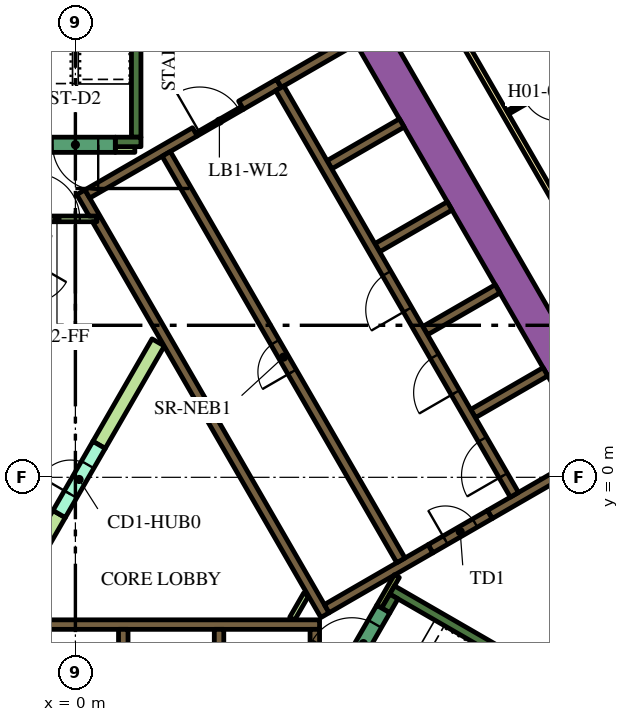
"""IFC4 building model, lengths in metres.
Left out: names, types, materials, properties, quantities, classifications, styles, units other than length and angle.
Written with IfcOpenShell. Run it as: python <this file> out.ifc"""

import sys

from ifc_helpers import new_model, si_unit, direction, frame, frame_2d, origin, place, context, subcontext, project, spatial, polyline, rectangle, outline, extrude, element, fill, save


model = new_model("IFC4")
c1 = context("Model", 3, precision=1e-05, world=origin(), true_north=direction((0.0, 1.0)))
c2 = subcontext(c1, "Body", "Model", "MODEL_VIEW")
j1 = project(units=[si_unit("LENGTHUNIT", "METRE"), si_unit("PLANEANGLEUNIT", "RADIAN")], contexts=[c1])
p1 = place(None, origin())
s1 = spatial("IfcSite", under=j1, at=p1, CompositionType="ELEMENT")
p2 = place(p1, origin())
s2 = spatial("IfcBuilding", under=s1, at=p2, CompositionType="ELEMENT")
p3 = place(p2, frame((0.0, 0.0, 35.4)))
s3 = spatial("IfcBuildingStorey", under=s2, at=p3, CompositionType="ELEMENT", Elevation=35.4)
p4 = place(p3, frame((6.711, 13.476, 0.0), z_axis=(0.0, 0.0, 1.0), x_axis=(0.500002723396, -0.866023831425, 0.0)))
e1 = element("IfcWall", 1, at=p4, inside=s3, PredefinedType="SOLIDWALL", context=c2, shape_type="SweptSolid", body=[
    extrude(rectangle(XDim=20.334, YDim=0.9, at=frame_2d((10.167, 0.0))), origin(), (0.0, 0.0, 1.0), 3.9),
])
p5 = place(p3, frame((11.695, -12.644, 0.0), z_axis=(0.0, 0.0, 1.0), x_axis=(0.500010229568, 0.86601949766, 0.0)))
e2 = element("IfcWall", 2, at=p5, inside=s3, PredefinedType="SOLIDWALL", context=c2, shape_type="SweptSolid", body=[
    extrude(rectangle(XDim=9.326, YDim=0.9, at=frame_2d((4.663, 0.0))), origin(), (0.0, 0.0, 1.0), 3.9),
])
p6 = place(p3, frame((8.334, -2.964, 0.0), z_axis=(0.0, 0.0, 1.0), x_axis=(0.866016039709, -0.500016218704, 0.0)))
e3 = element("IfcWall", 3, at=p6, inside=s3, PredefinedType="SOLIDWALL", context=c2, shape_type="SweptSolid", body=[
    extrude(rectangle(XDim=7.05, YDim=0.25, at=frame_2d((3.525, 0.0))), origin(), (0.0, 0.0, 1.0), 3.9),
])
p7 = place(p3, frame((8.168, -3.503, 0.0), z_axis=(0.0, 0.0, 1.0), x_axis=(0.49972245349, 0.866185586049, 0.0)))
e4 = element("IfcWall", 4, at=p7, inside=s3, PredefinedType="SOLIDWALL", context=c2, shape_type="SweptSolid", body=[
    extrude(rectangle(XDim=0.425, YDim=0.25, at=frame_2d((0.212, 0.0))), origin(), (0.0, 0.0, 1.0), 3.9),
])
p8 = place(p3, frame((1.6, 8.95, 0.0), z_axis=(0.0, 0.0, 1.0), x_axis=(0.0, 1.0, 0.0)))
e5 = element("IfcWall", 5, at=p8, inside=s3, PredefinedType="SOLIDWALL", context=c2, shape_type="SweptSolid", body=[
    extrude(rectangle(XDim=6.8, YDim=0.25, at=frame_2d((3.4, 0.0))), origin(), (0.0, 0.0, 1.0), 3.9),
])
p9 = place(p3, frame((1.05, 8.825, 0.0), z_axis=(0.0, 0.0, 1.0), x_axis=(1.0, 0.0, 0.0)))
e6 = element("IfcWall", 6, at=p9, inside=s3, PredefinedType="SOLIDWALL", context=c2, shape_type="SweptSolid", body=[
    extrude(rectangle(XDim=0.675, YDim=0.25, at=frame_2d((0.337, 0.0))), origin(), (0.0, 0.0, 1.0), 3.9),
])
p10 = place(p3, frame((-5.545, -3.875, 0.0), z_axis=(0.0, 0.0, 1.0), x_axis=(1.0, 0.0, 0.0)))
e7 = element("IfcWall", 7, at=p10, inside=s3, PredefinedType="SOLIDWALL", context=c2, shape_type="SweptSolid", body=[
    extrude(rectangle(XDim=11.97, YDim=0.25, at=frame_2d((5.985, 0.0))), origin(), (0.0, 0.0, 1.0), 3.9),
])
p11 = place(p3, frame((6.3, -7.268, 0.0), z_axis=(0.0, 0.0, 1.0), x_axis=(0.0, 1.0, 0.0)))
e8 = element("IfcWall", 8, at=p11, inside=s3, PredefinedType="SOLIDWALL", context=c2, shape_type="SweptSolid", body=[
    extrude(rectangle(XDim=3.268, YDim=0.25, at=frame_2d((1.634, 0.0))), origin(), (0.0, 0.0, 1.0), 3.9),
])
for number, where, z_axis, x_axis in (
    (9, (3.78, -4.0, 0.0), (0.0, 0.0, 1.0), (0.0, -1.0, 0.0)),
    (10, (1.26, -4.0, 0.0), (0.0, 0.0, 1.0), (0.0, -1.0, 0.0)),
    (11, (10.464, 1.677, 0.0), (0.0, 0.0, 1.0), (0.866, 0.5, 0.0)),
):
    element("IfcWall", number, at=place(p3, frame(where, z_axis=z_axis, x_axis=x_axis)), inside=s3, PredefinedType="SOLIDWALL", context=c2, shape_type="SweptSolid", body=[
        extrude(rectangle(XDim=2.2, YDim=0.25, at=frame_2d((1.1, 0.0))), origin(), (0.0, 0.0, 1.0), 3.9),
    ])
p12 = place(p3, frame((13.629, 0.594, 0.0), z_axis=(0.0, 0.0, 1.0), x_axis=(-0.86602790099, -0.499995674689, 0.0)))
e12 = element("IfcWall", 12, at=p12, inside=s3, PredefinedType="SOLIDWALL", context=c2, shape_type="SweptSolid", body=[
    extrude(rectangle(XDim=3.146, YDim=0.25, at=frame_2d((1.573, 0.0))), origin(), (0.0, 0.0, 1.0), 3.9),
])
p13 = place(p3, origin())
e13 = element("IfcWall", 13, at=p13, inside=s3, PredefinedType="SOLIDWALL", context=c2, shape_type="SweptSolid", body=[
    extrude(outline(polyline([(0.566, 6.725), (0.566, 6.875), (0.566, 6.875), (0.565, 6.875), (0.361, 6.875), (0.035, 7.439), (0.252, 7.564), (0.377, 7.348), (6.552, -3.348), (6.677, -3.564), (6.46, -3.689), (0.448, 6.725), (0.565, 6.725), (0.566, 6.725), (0.566, 6.725)])), origin(), (0.0, 0.0, 1.0), 3.9),
])
p14 = place(p3, frame((4.358, 9.791, 0.0), z_axis=(0.0, 0.0, 1.0), x_axis=(0.866079547155, 0.499906209203, 0.0)))
e14 = element("IfcWall", 14, at=p14, inside=s3, PredefinedType="SOLIDWALL", context=c2, shape_type="SweptSolid", body=[
    extrude(rectangle(XDim=1.15, YDim=0.25, at=frame_2d((0.575, 0.0))), origin(), (0.0, 0.0, 1.0), 3.9),
])
p15 = place(p3, frame((5.356, 10.367, 0.0), z_axis=(0.0, 0.0, 1.0), x_axis=(0.865978535641, 0.50008116922, 0.0)))
e15 = element("IfcWall", 15, at=p15, inside=s3, PredefinedType="SOLIDWALL", context=c2, shape_type="SweptSolid", body=[
    extrude(rectangle(XDim=2.278, YDim=0.25, at=frame_2d((1.139, 0.0))), origin(), (0.0, 0.0, 1.0), 3.9),
])
p16 = place(p3, frame((0.314, 7.456, 0.0), z_axis=(0.0, 0.0, 1.0), x_axis=(0.866013897511, 0.50001992892, 0.0)))
e16 = element("IfcWall", 16, at=p16, inside=s3, PredefinedType="SOLIDWALL", context=c2, shape_type="SweptSolid", body=[
    extrude(rectangle(XDim=3.268, YDim=0.25, at=frame_2d((1.634, 0.0))), origin(), (0.0, 0.0, 1.0), 3.9),
])
p17 = place(p3, frame((6.614, -3.456, 0.0), z_axis=(0.0, 0.0, 1.0), x_axis=(0.86602447079, 0.500001615989, 0.0)))
e17 = element("IfcWall", 17, at=p17, inside=s3, PredefinedType="SOLIDWALL", context=c2, shape_type="SweptSolid", body=[
    extrude(rectangle(XDim=3.154, YDim=0.25, at=frame_2d((1.577, 0.0))), origin(), (0.0, 0.0, 1.0), 3.9),
])
for number, where, z_axis, x_axis in (
    (18, (6.684, 8.224, 0.0), (0.0, 0.0, 1.0), (0.866, 0.5, 0.0)),
    (19, (7.944, 6.041, 0.0), (0.0, 0.0, 1.0), (0.866, 0.5, 0.0)),
    (20, (9.204, 3.859, 0.0), (0.0, 0.0, 1.0), (0.866, 0.5, 0.0)),
):
    element("IfcWall", number, at=place(p3, frame(where, z_axis=z_axis, x_axis=x_axis)), inside=s3, PredefinedType="SOLIDWALL", context=c2, shape_type="SweptSolid", body=[
        extrude(rectangle(XDim=2.2, YDim=0.25, at=frame_2d((1.1, 0.0))), origin(), (0.0, 0.0, 1.0), 3.9),
    ])
p18 = place(p3, frame((5.705, -3.718, 0.0), z_axis=(0.0, 0.0, 1.0), x_axis=(0.499962090823, 0.866047289552, 0.0)))
e21 = element("IfcWall", 21, at=p18, inside=s3, PredefinedType="PARTITIONING", context=c2, shape_type="SweptSolid", body=[
    extrude(rectangle(XDim=0.735, YDim=0.15, at=frame_2d((0.367, 0.0))), origin(), (0.0, 0.0, 1.0), 2.75),
])
p19 = place(p3, frame((8.459, -2.599, 0.0), z_axis=(0.0, 0.0, 1.0), x_axis=(-0.500041054325, -0.866001699761, 0.0)))
e22 = element("IfcWall", 22, at=p19, inside=s3, PredefinedType="PARTITIONING", context=c2, shape_type="SweptSolid", body=[
    extrude(rectangle(XDim=0.929, YDim=0.15, at=frame_2d((0.464, 0.0))), origin(), (0.0, 0.0, 1.0), 3.9),
])
e23 = element("IfcWall", 23, at=p13, inside=s3, PredefinedType="PARTITIONING", context=c2, shape_type="SweptSolid", body=[
    extrude(outline(polyline([(-0.59, -0.872), (-0.265, -1.059), (-1.822, -3.756), (-2.147, -3.568), (-0.59, -0.872)])), origin(), (0.0, 0.0, 1.0), 2.75),
])
e24 = element("IfcWall", 24, at=p13, inside=s3, PredefinedType="PARTITIONING", context=c2, shape_type="SweptSolid", body=[
    extrude(outline(polyline([(2.017, 3.643), (2.342, 3.456), (0.785, 0.76), (0.46, 0.947), (2.017, 3.643)])), origin(), (0.0, 0.0, 1.0), 2.75),
])
p20 = place(p3, frame((1.05, 8.625, 0.0), z_axis=(0.0, 0.0, 1.0), x_axis=(1.0, 0.0, 0.0)))
e25 = element("IfcWall", 25, at=p20, inside=s3, PredefinedType="PARTITIONING", context=c2, shape_type="SweptSolid", body=[
    extrude(rectangle(XDim=0.514, YDim=0.15, at=frame_2d((0.257, 0.0))), origin(), (0.0, 0.0, 1.0), 2.75),
])
p21 = place(p3, frame((11.553, -0.46, 0.0), z_axis=(0.0, 0.0, 1.0), x_axis=(-0.500006514828, 0.866021642414, 0.0)))
e26 = element("IfcWall", 26, at=p21, inside=s3, PredefinedType="SOLIDWALL", context=c2, shape_type="SweptSolid", body=[
    extrude(rectangle(XDim=12.35, YDim=0.25, at=frame_2d((6.175, 0.0))), origin(), (0.0, 0.0, 1.0), 3.9),
])
p22 = place(p21, frame((0.585, 0.0, 0.0)))
e27 = element("IfcOpeningElement", 27, at=p22, cuts=e26, PredefinedType="OPENING", context=c2, shape_type="SweptSolid", body=[
    extrude(rectangle(XDim=1.1, YDim=2.1, at=frame_2d((0.55, 1.05))), frame((0.0, 0.135, 0.0), z_axis=(0.0, -1.0, 0.0), x_axis=(1.0, 0.0, 0.0)), (0.0, 0.0, 1.0), 0.27),
])
p23 = place(p21, frame((3.105, 0.0, 0.0)))
e28 = element("IfcOpeningElement", 28, at=p23, cuts=e26, PredefinedType="OPENING", context=c2, shape_type="SweptSolid", body=[
    extrude(rectangle(XDim=1.1, YDim=2.1, at=frame_2d((0.55, 1.05))), frame((0.0, 0.135, 0.0), z_axis=(0.0, -1.0, 0.0), x_axis=(1.0, 0.0, 0.0)), (0.0, 0.0, 1.0), 0.27),
])
p24 = place(p21, frame((5.625, 0.0, 0.0)))
e29 = element("IfcOpeningElement", 29, at=p24, cuts=e26, PredefinedType="OPENING", context=c2, shape_type="SweptSolid", body=[
    extrude(rectangle(XDim=1.1, YDim=2.1, at=frame_2d((0.55, 1.05))), frame((0.0, 0.135, 0.0), z_axis=(0.0, -1.0, 0.0), x_axis=(1.0, 0.0, 0.0)), (0.0, 0.0, 1.0), 0.27),
])
p25 = place(p3, frame((8.565, -2.185, 0.0), z_axis=(0.0, 0.0, 1.0), x_axis=(-0.499997954832, 0.866026584559, 0.0)))
e30 = element("IfcWall", 30, at=p25, inside=s3, PredefinedType="SOLIDWALL", context=c2, shape_type="SweptSolid", body=[
    extrude(rectangle(XDim=12.35, YDim=0.25, at=frame_2d((6.175, 0.0))), origin(), (0.0, 0.0, 1.0), 3.9),
])
p26 = place(p25, frame((5.725, 0.0, 0.0)))
e31 = element("IfcOpeningElement", 31, at=p26, cuts=e30, PredefinedType="OPENING", context=c2, shape_type="SweptSolid", body=[
    extrude(rectangle(XDim=0.9, YDim=2.1, at=frame_2d((0.45, 1.05))), frame((0.0, 0.135, 0.0), z_axis=(0.0, -1.0, 0.0), x_axis=(1.0, 0.0, 0.0)), (0.0, 0.0, 1.0), 0.27),
])
p27 = place(p3, frame((7.053, -5.284, 0.0), z_axis=(0.0, 0.0, 1.0), x_axis=(0.500078061341, 0.865980330357, 0.0)))
e32 = element("IfcWall", 32, at=p27, inside=s3, PredefinedType="SOLIDWALL", context=c2, shape_type="SweptSolid", body=[
    extrude(rectangle(XDim=2.1, YDim=0.4, at=frame_2d((1.05, 0.0))), origin(), (0.0, 0.0, 1.0), 3.9),
])
p28 = place(p27, frame((0.45, 0.0, 0.0)))
e33 = element("IfcOpeningElement", 33, at=p28, cuts=e32, PredefinedType="OPENING", context=c2, shape_type="SweptSolid", body=[
    extrude(rectangle(XDim=1.2, YDim=2.1, at=frame_2d((0.6, 1.05))), frame((0.0, 0.21, 0.0), z_axis=(0.0, -1.0, 0.0), x_axis=(1.0, 0.0, 0.0)), (0.0, 0.0, 1.0), 0.42),
])
p29 = place(p3, frame((9.346, -1.879, 0.0), z_axis=(0.0, 0.0, 1.0), x_axis=(0.866047807691, 0.499961193289, 0.0)))
e34 = element("IfcWall", 34, at=p29, inside=s3, PredefinedType="SOLIDWALL", context=c2, shape_type="SweptSolid", body=[
    extrude(rectangle(XDim=1.8, YDim=0.25, at=frame_2d((0.9, 0.0))), origin(), (0.0, 0.0, 1.0), 3.9),
])
p30 = place(p29, frame((0.45, 0.0, 0.0)))
e35 = element("IfcOpeningElement", 35, at=p30, cuts=e34, PredefinedType="OPENING", context=c2, shape_type="SweptSolid", body=[
    extrude(rectangle(XDim=0.9, YDim=2.1, at=frame_2d((0.45, 1.05))), frame((0.0, 0.135, 0.0), z_axis=(0.0, -1.0, 0.0), x_axis=(1.0, 0.0, 0.0)), (0.0, 0.0, 1.0), 0.27),
])
p31 = place(p3, frame((1.05, 8.75, 0.0), z_axis=(0.0, 0.0, 1.0), x_axis=(-1.0, 0.0, 0.0)))
e36 = element("IfcWall", 36, at=p31, inside=s3, PredefinedType="SOLIDWALL", context=c2, shape_type="SweptSolid", body=[
    extrude(rectangle(XDim=2.1, YDim=0.4, at=frame_2d((1.05, 0.0))), origin(), (0.0, 0.0, 1.0), 3.9),
])
p32 = place(p31, frame((0.45, 0.0, 0.0)))
e37 = element("IfcOpeningElement", 37, at=p32, cuts=e36, PredefinedType="OPENING", context=c2, shape_type="SweptSolid", body=[
    extrude(rectangle(XDim=1.2, YDim=2.1, at=frame_2d((0.6, 1.05))), frame((0.0, 0.21, 0.0), z_axis=(0.0, -1.0, 0.0), x_axis=(1.0, 0.0, 0.0)), (0.0, 0.0, 1.0), 0.42),
])
p33 = place(p3, frame((-0.427, -0.966, 0.0), z_axis=(0.0, 0.0, 1.0), x_axis=(0.49994051562, 0.866059744384, 0.0)))
e38 = element("IfcWall", 38, at=p33, inside=s3, PredefinedType="PARTITIONING", context=c2, shape_type="SweptSolid", body=[
    extrude(rectangle(XDim=2.1, YDim=0.375, at=frame_2d((1.05, 0.0))), origin(), (0.0, 0.0, 1.0), 2.75),
])
p34 = place(p33, frame((0.6, 0.0, 0.0)))
e39 = element("IfcOpeningElement", 39, at=p34, cuts=e38, PredefinedType="OPENING", context=c2, shape_type="SweptSolid", body=[
    extrude(rectangle(XDim=0.9, YDim=2.1, at=frame_2d((0.45, 1.05))), frame((0.0, 0.198, 0.0), z_axis=(0.0, -1.0, 0.0), x_axis=(1.0, 0.0, 0.0)), (0.0, 0.0, 1.0), 0.395),
])
p35 = place(p3, frame((-1.534, 6.8, 0.0), z_axis=(0.0, 0.0, 1.0), x_axis=(1.0, 0.0, 0.0)))
e40 = element("IfcWall", 40, at=p35, inside=s3, PredefinedType="PARTITIONING", context=c2, shape_type="SweptSolid", body=[
    extrude(rectangle(XDim=2.1, YDim=0.15, at=frame_2d((1.05, 0.0))), origin(), (0.0, 0.0, 1.0), 2.75),
])
p36 = place(p35, frame((0.45, 0.0, 0.0)))
e41 = element("IfcOpeningElement", 41, at=p36, cuts=e40, PredefinedType="OPENING", context=c2, shape_type="SweptSolid", body=[
    extrude(rectangle(XDim=1.2, YDim=2.1, at=frame_2d((0.6, 1.05))), frame((0.0, 0.085, 0.0), z_axis=(0.0, -1.0, 0.0), x_axis=(1.0, 0.0, 0.0)), (0.0, 0.0, 1.0), 0.17),
])
p37 = place(p3, frame((3.183, 9.02, 0.0), z_axis=(0.0, 0.0, 1.0), x_axis=(0.866034573852, 0.49998411664, 0.0)))
e42 = element("IfcWall", 42, at=p37, inside=s3, PredefinedType="PARTITIONING", context=c2, shape_type="SweptSolid", body=[
    extrude(rectangle(XDim=1.4, YDim=0.09, at=frame_2d((0.7, 0.0))), origin(), (0.0, 0.0, 1.0), 2.75),
])
p38 = place(p37, frame((0.1, 0.0, 0.0)))
e43 = element("IfcOpeningElement", 43, at=p38, cuts=e42, PredefinedType="OPENING", context=c2, shape_type="SweptSolid", body=[
    extrude(rectangle(XDim=1.2, YDim=2.1, at=frame_2d((0.6, 1.05))), frame((0.0, 0.055, 0.0), z_axis=(0.0, -1.0, 0.0), x_axis=(1.0, 0.0, 0.0)), (0.0, 0.0, 1.0), 0.11),
])
p39 = place(p3, frame((6.163, 18.475, 0.0), z_axis=(0.0, 0.0, 1.0), x_axis=(0.500001317485, -0.866024643133, 0.0)))
e44 = element("IfcWall", 44, at=p39, inside=s3, PredefinedType="PARTITIONING", context=c2, shape_type="SweptSolid", body=[
    extrude(rectangle(XDim=25.767, YDim=0.15, at=frame_2d((12.883, 0.0))), origin(), (0.0, 0.0, 1.0), 2.75),
])
p40 = place(p39, frame((24.586, 0.0, 0.0)))
e45 = element("IfcOpeningElement", 45, at=p40, cuts=e44, PredefinedType="OPENING", context=c2, shape_type="SweptSolid", body=[
    extrude(rectangle(XDim=1.0, YDim=2.1, at=frame_2d((0.5, 1.05))), frame((0.0, 0.085, 0.0), z_axis=(0.0, -1.0, 0.0), x_axis=(1.0, 0.0, 0.0)), (0.0, 0.0, 1.0), 0.17),
])
p41 = place(p39, frame((19.319, 0.0, 0.0)))
e46 = element("IfcOpeningElement", 46, at=p41, cuts=e44, PredefinedType="OPENING", context=c2, shape_type="SweptSolid", body=[
    extrude(rectangle(XDim=1.0, YDim=2.1, at=frame_2d((0.5, 1.05))), frame((0.0, 0.085, 0.0), z_axis=(0.0, -1.0, 0.0), x_axis=(1.0, 0.0, 0.0)), (0.0, 0.0, 1.0), 0.17),
])
p42 = place(p39, frame((18.012, 0.0, 0.0)))
e47 = element("IfcOpeningElement", 47, at=p42, cuts=e44, PredefinedType="OPENING", context=c2, shape_type="SweptSolid", body=[
    extrude(rectangle(XDim=1.0, YDim=2.1, at=frame_2d((0.5, 1.05))), frame((0.0, 0.085, 0.0), z_axis=(0.0, -1.0, 0.0), x_axis=(1.0, 0.0, 0.0)), (0.0, 0.0, 1.0), 0.17),
])
p43 = place(p39, frame((6.824, 0.0, 0.0)))
e48 = element("IfcOpeningElement", 48, at=p43, cuts=e44, PredefinedType="OPENING", context=c2, shape_type="SweptSolid", body=[
    extrude(rectangle(XDim=1.1, YDim=2.1, at=frame_2d((0.55, 1.05))), frame((0.0, 0.085, 0.0), z_axis=(0.0, -1.0, 0.0), x_axis=(1.0, 0.0, 0.0)), (0.0, 0.0, 1.0), 0.17),
])
p44 = place(p39, frame((4.658, 0.0, 0.0)))
e49 = element("IfcOpeningElement", 49, at=p44, cuts=e44, PredefinedType="OPENING", context=c2, shape_type="SweptSolid", body=[
    extrude(rectangle(XDim=0.9, YDim=2.1, at=frame_2d((0.45, 1.05))), frame((0.0, 0.085, 0.0), z_axis=(0.0, -1.0, 0.0), x_axis=(1.0, 0.0, 0.0)), (0.0, 0.0, 1.0), 0.17),
])
p45 = place(p39, frame((0.18, 0.0, 0.0)))
e50 = element("IfcOpeningElement", 50, at=p45, cuts=e44, PredefinedType="OPENING", context=c2, shape_type="SweptSolid", body=[
    extrude(rectangle(XDim=1.0, YDim=2.1, at=frame_2d((0.5, 1.05))), frame((0.0, 0.085, 0.0), z_axis=(0.0, -1.0, 0.0), x_axis=(1.0, 0.0, 0.0)), (0.0, 0.0, 1.0), 0.17),
])
p46 = place(p3, frame((13.799, 10.999, 0.0), z_axis=(0.0, 0.0, 1.0), x_axis=(-0.866034573852, -0.49998411664, 0.0)))
e51 = element("IfcWall", 51, at=p46, inside=s3, PredefinedType="PARTITIONING", context=c2, shape_type="SweptSolid", body=[
    extrude(rectangle(XDim=2.8, YDim=0.1, at=frame_2d((1.4, 0.0))), origin(), (0.0, 0.0, 1.0), 2.75),
])
p47 = place(p46, frame((1.25, 0.0, 0.0)))
e52 = element("IfcOpeningElement", 52, at=p47, cuts=e51, PredefinedType="OPENING", context=c2, shape_type="SweptSolid", body=[
    extrude(rectangle(XDim=1.0, YDim=2.1, at=frame_2d((0.5, 1.05))), frame((0.0, 0.06, 0.0), z_axis=(0.0, -1.0, 0.0), x_axis=(1.0, 0.0, 0.0)), (0.0, 0.0, 1.0), 0.12),
])
p48 = place(p22, origin())
e53 = element("IfcDoor", 53, at=p48, inside=s3, OperationType="DOUBLE_DOOR_SLIDING", PredefinedType="DOOR", context=c2, shape_type="SweptSolid", body=[
    extrude(rectangle(XDim=1.1, YDim=2.1, at=frame_2d((0.55, 1.05))), frame((0.0, 0.025, 0.0), z_axis=(0.0, -1.0, 0.0), x_axis=(1.0, 0.0, 0.0)), (0.0, 0.0, 1.0), 0.05),
])
fill(e27, e53)
p49 = place(p23, origin())
e54 = element("IfcDoor", 54, at=p49, inside=s3, OperationType="DOUBLE_DOOR_SLIDING", PredefinedType="DOOR", context=c2, shape_type="SweptSolid", body=[
    extrude(rectangle(XDim=1.1, YDim=2.1, at=frame_2d((0.55, 1.05))), frame((0.0, 0.025, 0.0), z_axis=(0.0, -1.0, 0.0), x_axis=(1.0, 0.0, 0.0)), (0.0, 0.0, 1.0), 0.05),
])
fill(e28, e54)
p50 = place(p24, origin())
e55 = element("IfcDoor", 55, at=p50, inside=s3, OperationType="DOUBLE_DOOR_SLIDING", PredefinedType="DOOR", context=c2, shape_type="SweptSolid", body=[
    extrude(rectangle(XDim=1.1, YDim=2.1, at=frame_2d((0.55, 1.05))), frame((0.0, 0.025, 0.0), z_axis=(0.0, -1.0, 0.0), x_axis=(1.0, 0.0, 0.0)), (0.0, 0.0, 1.0), 0.05),
])
fill(e29, e55)
p51 = place(p26, origin())
e56 = element("IfcDoor", 56, at=p51, inside=s3, OperationType="SINGLE_SWING_LEFT", PredefinedType="DOOR", context=c2, shape_type="SweptSolid", body=[
    extrude(rectangle(XDim=0.9, YDim=2.1, at=frame_2d((0.45, 1.05))), frame((0.0, 0.025, 0.0), z_axis=(0.0, -1.0, 0.0), x_axis=(1.0, 0.0, 0.0)), (0.0, 0.0, 1.0), 0.05),
])
fill(e31, e56)
p52 = place(p28, origin())
e57 = element("IfcDoor", 57, at=p52, inside=s3, OperationType="SINGLE_SWING_LEFT", PredefinedType="DOOR", context=c2, shape_type="SweptSolid", body=[
    extrude(rectangle(XDim=1.2, YDim=2.1, at=frame_2d((0.6, 1.05))), frame((0.0, 0.025, 0.0), z_axis=(0.0, -1.0, 0.0), x_axis=(1.0, 0.0, 0.0)), (0.0, 0.0, 1.0), 0.05),
])
fill(e33, e57)
p53 = place(p30, origin())
e58 = element("IfcDoor", 58, at=p53, inside=s3, OperationType="SINGLE_SWING_LEFT", PredefinedType="DOOR", context=c2, shape_type="SweptSolid", body=[
    extrude(rectangle(XDim=0.9, YDim=2.1, at=frame_2d((0.45, 1.05))), frame((0.0, 0.025, 0.0), z_axis=(0.0, -1.0, 0.0), x_axis=(1.0, 0.0, 0.0)), (0.0, 0.0, 1.0), 0.05),
])
fill(e35, e58)
p54 = place(p32, origin())
e59 = element("IfcDoor", 59, at=p54, inside=s3, OperationType="SINGLE_SWING_LEFT", PredefinedType="DOOR", context=c2, shape_type="SweptSolid", body=[
    extrude(rectangle(XDim=1.2, YDim=2.1, at=frame_2d((0.6, 1.05))), frame((0.0, 0.025, 0.0), z_axis=(0.0, -1.0, 0.0), x_axis=(1.0, 0.0, 0.0)), (0.0, 0.0, 1.0), 0.05),
])
fill(e37, e59)
p55 = place(p34, origin())
e60 = element("IfcDoor", 60, at=p55, inside=s3, OperationType="SINGLE_SWING_LEFT", PredefinedType="DOOR", context=c2, shape_type="SweptSolid", body=[
    extrude(rectangle(XDim=0.9, YDim=2.1, at=frame_2d((0.45, 1.05))), frame((0.0, 0.025, 0.0), z_axis=(0.0, -1.0, 0.0), x_axis=(1.0, 0.0, 0.0)), (0.0, 0.0, 1.0), 0.05),
])
fill(e39, e60)
p56 = place(p36, origin())
e61 = element("IfcDoor", 61, at=p56, inside=s3, OperationType="SINGLE_SWING_LEFT", PredefinedType="DOOR", context=c2, shape_type="SweptSolid", body=[
    extrude(rectangle(XDim=1.2, YDim=2.1, at=frame_2d((0.6, 1.05))), frame((0.0, 0.025, 0.0), z_axis=(0.0, -1.0, 0.0), x_axis=(1.0, 0.0, 0.0)), (0.0, 0.0, 1.0), 0.05),
])
fill(e41, e61)
p57 = place(p38, origin())
e62 = element("IfcDoor", 62, at=p57, inside=s3, OperationType="SINGLE_SWING_LEFT", PredefinedType="DOOR", context=c2, shape_type="SweptSolid", body=[
    extrude(rectangle(XDim=1.2, YDim=2.1, at=frame_2d((0.6, 1.05))), frame((0.0, 0.025, 0.0), z_axis=(0.0, -1.0, 0.0), x_axis=(1.0, 0.0, 0.0)), (0.0, 0.0, 1.0), 0.05),
])
fill(e43, e62)
p58 = place(p47, origin())
e63 = element("IfcDoor", 63, at=p58, inside=s3, OperationType="SINGLE_SWING_LEFT", PredefinedType="DOOR", context=c2, shape_type="SweptSolid", body=[
    extrude(rectangle(XDim=1.0, YDim=2.1, at=frame_2d((0.5, 1.05))), frame((0.0, 0.025, 0.0), z_axis=(0.0, -1.0, 0.0), x_axis=(1.0, 0.0, 0.0)), (0.0, 0.0, 1.0), 0.05),
])
fill(e52, e63)
save(model, sys.argv[1])
